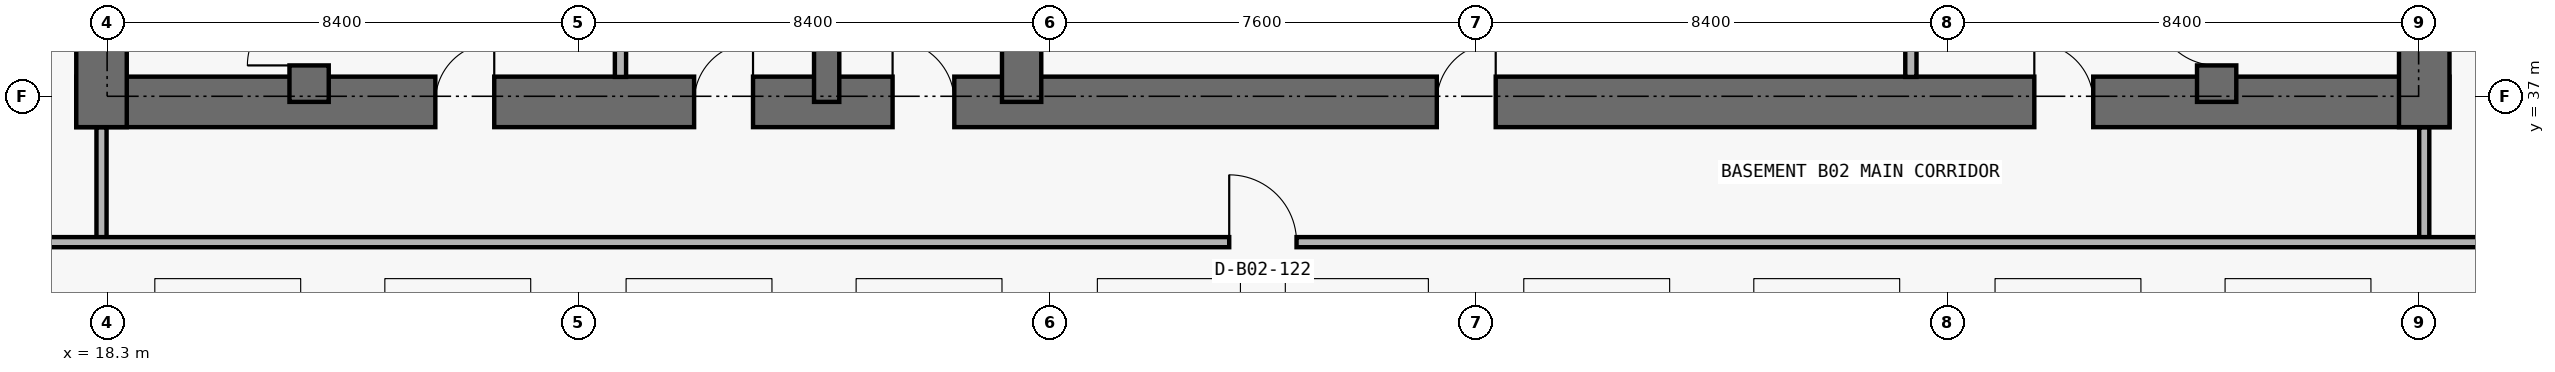
"""IFC4 building model, lengths in metres.
Left out: names, types, materials, properties, quantities, classifications, styles, units other than length and angle.
Written with IfcOpenShell. Run it as: python <this file> out.ifc"""

import sys

from ifc_helpers import new_model, si_unit, direction, frame, frame_2d, origin, place, context, subcontext, project, spatial, rectangle, extrude, element, fill, save


model = new_model("IFC4")
c1 = context("Model", 3, precision=1e-05, world=origin(), true_north=direction((0.0, 1.0)))
c2 = subcontext(c1, "Body", "Model", "MODEL_VIEW")
j1 = project(units=[si_unit("LENGTHUNIT", "METRE"), si_unit("PLANEANGLEUNIT", "RADIAN")], contexts=[c1])
p1 = place(None, origin())
s1 = spatial("IfcSite", under=j1, at=p1, CompositionType="ELEMENT")
p2 = place(p1, origin())
s2 = spatial("IfcBuilding", under=s1, at=p2, CompositionType="ELEMENT")
p3 = place(p2, frame((0.0, 0.0, -9.0)))
s3 = spatial("IfcBuildingStorey", under=s2, at=p3, CompositionType="ELEMENT", Elevation=-9.0)
p4 = place(p3, frame((17.75, 36.9, 0.0), z_axis=(0.0, 0.0, 1.0), x_axis=(1.0, 0.0, 0.0)))
e1 = element("IfcWall", 1, at=p4, inside=s3, PredefinedType="SHEAR", context=c2, shape_type="SweptSolid", body=[
    extrude(rectangle(XDim=42.3, YDim=0.9, at=frame_2d((21.15, 0.0))), origin(), (0.0, 0.0, 1.0), 4.2),
])
p5 = place(p4, frame((14.55, 0.0, 0.0)))
e2 = element("IfcOpeningElement", 2, at=p5, cuts=e1, PredefinedType="OPENING", context=c2, shape_type="SweptSolid", body=[
    extrude(rectangle(XDim=1.1, YDim=2.15, at=frame_2d((0.55, 1.075))), frame((0.0, 0.46, 0.0), z_axis=(0.0, -1.0, 0.0), x_axis=(1.0, 0.0, 0.0)), (0.0, 0.0, 1.0), 0.92),
])
p6 = place(p4, frame((6.4, 0.0, 0.0)))
e3 = element("IfcOpeningElement", 3, at=p6, cuts=e1, PredefinedType="OPENING", context=c2, shape_type="SweptSolid", body=[
    extrude(rectangle(XDim=1.05, YDim=2.15, at=frame_2d((0.525, 1.075))), frame((0.0, 0.46, 0.0), z_axis=(0.0, -1.0, 0.0), x_axis=(1.0, 0.0, 0.0)), (0.0, 0.0, 1.0), 0.92),
])
p7 = place(p4, frame((34.9, 0.0, 0.0)))
e4 = element("IfcOpeningElement", 4, at=p7, cuts=e1, PredefinedType="OPENING", context=c2, shape_type="SweptSolid", body=[
    extrude(rectangle(XDim=1.05, YDim=2.15, at=frame_2d((0.525, 1.075))), frame((0.0, 0.46, 0.0), z_axis=(0.0, -1.0, 0.0), x_axis=(1.0, 0.0, 0.0)), (0.0, 0.0, 1.0), 0.92),
])
p8 = place(p4, frame((11.012, 0.0, 0.0)))
e5 = element("IfcOpeningElement", 5, at=p8, cuts=e1, PredefinedType="OPENING", context=c2, shape_type="SweptSolid", body=[
    extrude(rectangle(XDim=1.05, YDim=2.15, at=frame_2d((0.525, 1.075))), frame((0.0, 0.46, 0.0), z_axis=(0.0, -1.0, 0.0), x_axis=(1.0, 0.0, 0.0)), (0.0, 0.0, 1.0), 0.92),
])
p9 = place(p4, frame((24.25, 0.0, 0.0)))
e6 = element("IfcOpeningElement", 6, at=p9, cuts=e1, PredefinedType="OPENING", context=c2, shape_type="SweptSolid", body=[
    extrude(rectangle(XDim=1.05, YDim=2.15, at=frame_2d((0.525, 1.075))), frame((0.0, 0.46, 0.0), z_axis=(0.0, -1.0, 0.0), x_axis=(1.0, 0.0, 0.0)), (0.0, 0.0, 1.0), 0.92),
])
for number, where, z_axis, x_axis in (
    (7, (18.2, 36.45, 0.0), (0.0, 0.0, 1.0), (0.0, 1.0, 0.0)),
    (8, (59.6, 36.45, 0.0), (0.0, 0.0, 1.0), (0.0, 1.0, 0.0)),
):
    element("IfcWall", number, at=place(p3, frame(where, z_axis=z_axis, x_axis=x_axis)), inside=s3, PredefinedType="SHEAR", context=c2, shape_type="SweptSolid", body=[
        extrude(rectangle(XDim=14.15, YDim=0.9, at=frame_2d((7.075, 0.0))), origin(), (0.0, 0.0, 1.0), 4.2),
    ])
p10 = place(p3, frame((21.9, 36.9, 0.0), z_axis=(0.0, 0.0, 1.0), x_axis=(0.0, 1.0, 0.0)))
e9 = element("IfcWall", 9, at=p10, inside=s3, PredefinedType="SHEAR", context=c2, shape_type="SweptSolid", body=[
    extrude(rectangle(XDim=9.675, YDim=0.7, at=frame_2d((4.837, 0.0))), origin(), (0.0, 0.0, 1.0), 4.2),
])
p11 = place(p10, frame((0.65, 0.0, 0.0)))
e10 = element("IfcOpeningElement", 10, at=p11, cuts=e9, PredefinedType="OPENING", context=c2, shape_type="SweptSolid", body=[
    extrude(rectangle(XDim=1.1, YDim=2.15, at=frame_2d((0.55, 1.075))), frame((0.0, 0.36, 0.0), z_axis=(0.0, -1.0, 0.0), x_axis=(1.0, 0.0, 0.0)), (0.0, 0.0, 1.0), 0.72),
])
p12 = place(p3, frame((55.9, 36.9, 0.0), z_axis=(0.0, 0.0, 1.0), x_axis=(0.0, 1.0, 0.0)))
e11 = element("IfcWall", 11, at=p12, inside=s3, PredefinedType="SHEAR", context=c2, shape_type="SweptSolid", body=[
    extrude(rectangle(XDim=9.675, YDim=0.7, at=frame_2d((4.837, 0.0))), origin(), (0.0, 0.0, 1.0), 4.2),
])
p13 = place(p12, frame((0.65, 0.0, 0.0)))
e12 = element("IfcOpeningElement", 12, at=p13, cuts=e11, PredefinedType="OPENING", context=c2, shape_type="SweptSolid", body=[
    extrude(rectangle(XDim=1.1, YDim=2.15, at=frame_2d((0.55, 1.075))), frame((0.0, 0.36, 0.0), z_axis=(0.0, -1.0, 0.0), x_axis=(1.0, 0.0, 0.0)), (0.0, 0.0, 1.0), 0.72),
])
p14 = place(p3, frame((31.125, 36.9, 0.0), z_axis=(0.0, 0.0, 1.0), x_axis=(0.0, 1.0, 0.0)))
e13 = element("IfcWall", 13, at=p14, inside=s3, PredefinedType="SHEAR", context=c2, shape_type="SweptSolid", body=[
    extrude(rectangle(XDim=9.675, YDim=0.45, at=frame_2d((4.837, 0.0))), origin(), (0.0, 0.0, 1.0), 4.2),
])
p15 = place(p3, frame((34.6, 36.9, 0.0), z_axis=(0.0, 0.0, 1.0), x_axis=(0.0, 1.0, 0.0)))
e14 = element("IfcWall", 14, at=p15, inside=s3, PredefinedType="SHEAR", context=c2, shape_type="SweptSolid", body=[
    extrude(rectangle(XDim=9.675, YDim=0.7, at=frame_2d((4.837, 0.0))), origin(), (0.0, 0.0, 1.0), 4.2),
])
p16 = place(p3, frame((18.2, 34.4, 0.0), z_axis=(0.0, 0.0, 1.0), x_axis=(0.0, 1.0, 0.0)))
e15 = element("IfcWall", 15, at=p16, inside=s3, PredefinedType="PARTITIONING", context=c2, shape_type="SweptSolid", body=[
    extrude(rectangle(XDim=2.045, YDim=0.18, at=frame_2d((1.022, 0.0))), origin(), (0.0, 0.0, 1.0), 3.085),
])
for number, where, z_axis, x_axis in (
    (16, (27.45, 37.345, 0.0), (0.0, 0.0, 1.0), (0.0, 1.0, 0.0)),
    (17, (50.45, 37.345, 0.0), (0.0, 0.0, 1.0), (0.0, 1.0, 0.0)),
):
    element("IfcWall", number, at=place(p3, frame(where, z_axis=z_axis, x_axis=x_axis)), inside=s3, PredefinedType="PARTITIONING", context=c2, shape_type="SweptSolid", body=[
        extrude(rectangle(XDim=5.385, YDim=0.2, at=frame_2d((2.692, 0.0))), origin(), (0.0, 0.0, 1.0), 4.2),
    ])
p17 = place(p3, frame((59.6, 34.4, 0.0), z_axis=(0.0, 0.0, 1.0), x_axis=(0.0, 1.0, 0.0)))
e18 = element("IfcWall", 18, at=p17, inside=s3, PredefinedType="PARTITIONING", context=c2, shape_type="SweptSolid", body=[
    extrude(rectangle(XDim=2.045, YDim=0.18, at=frame_2d((1.022, 0.0))), origin(), (0.0, 0.0, 1.0), 3.085),
])
p18 = place(p3, frame((8.15, 34.4, 0.0), z_axis=(0.0, 0.0, 1.0), x_axis=(1.0, 0.0, 0.0)))
e19 = element("IfcWall", 19, at=p18, inside=s3, PredefinedType="PARTITIONING", context=c2, shape_type="SweptSolid", body=[
    extrude(rectangle(XDim=61.5, YDim=0.18, at=frame_2d((30.75, 0.0))), origin(), (0.0, 0.0, 1.0), 4.2),
])
p19 = place(p18, frame((30.15, 0.0, 0.0)))
e20 = element("IfcOpeningElement", 20, at=p19, cuts=e19, PredefinedType="OPENING", context=c2, shape_type="SweptSolid", body=[
    extrude(rectangle(XDim=1.2, YDim=2.2, at=frame_2d((0.6, 1.1))), frame((0.0, 0.1, 0.0), z_axis=(0.0, -1.0, 0.0), x_axis=(1.0, 0.0, 0.0)), (0.0, 0.0, 1.0), 0.2),
])
p20 = place(p18, frame((4.425, 0.0, 0.0)))
e21 = element("IfcOpeningElement", 21, at=p20, cuts=e19, PredefinedType="OPENING", context=c2, shape_type="SweptSolid", body=[
    extrude(rectangle(XDim=1.2, YDim=2.2, at=frame_2d((0.6, 1.1))), frame((0.0, 0.1, 0.0), z_axis=(0.0, -1.0, 0.0), x_axis=(1.0, 0.0, 0.0)), (0.0, 0.0, 1.0), 0.2),
])
p21 = place(p18, frame((55.875, 0.0, 0.0)))
e22 = element("IfcOpeningElement", 22, at=p21, cuts=e19, PredefinedType="OPENING", context=c2, shape_type="SweptSolid", body=[
    extrude(rectangle(XDim=1.2, YDim=2.2, at=frame_2d((0.6, 1.1))), frame((0.0, 0.1, 0.0), z_axis=(0.0, -1.0, 0.0), x_axis=(1.0, 0.0, 0.0)), (0.0, 0.0, 1.0), 0.2),
])
p22 = place(p5, origin())
e23 = element("IfcDoor", 23, at=p22, inside=s3, OperationType="SINGLE_SWING_LEFT", PredefinedType="DOOR", context=c2, shape_type="SweptSolid", body=[
    extrude(rectangle(XDim=1.1, YDim=2.15, at=frame_2d((0.55, 1.075))), frame((0.0, 0.025, 0.0), z_axis=(0.0, -1.0, 0.0), x_axis=(1.0, 0.0, 0.0)), (0.0, 0.0, 1.0), 0.05),
])
fill(e2, e23)
p23 = place(p6, origin())
e24 = element("IfcDoor", 24, at=p23, inside=s3, OperationType="SINGLE_SWING_RIGHT", PredefinedType="DOOR", context=c2, shape_type="SweptSolid", body=[
    extrude(rectangle(XDim=1.05, YDim=2.15, at=frame_2d((0.525, 1.075))), frame((0.0, 0.025, 0.0), z_axis=(0.0, -1.0, 0.0), x_axis=(1.0, 0.0, 0.0)), (0.0, 0.0, 1.0), 0.05),
])
fill(e3, e24)
p24 = place(p11, origin())
e25 = element("IfcDoor", 25, at=p24, inside=s3, OperationType="SINGLE_SWING_LEFT", PredefinedType="DOOR", context=c2, shape_type="SweptSolid", body=[
    extrude(rectangle(XDim=1.1, YDim=2.15, at=frame_2d((0.55, 1.075))), frame((0.0, 0.025, 0.0), z_axis=(0.0, -1.0, 0.0), x_axis=(1.0, 0.0, 0.0)), (0.0, 0.0, 1.0), 0.05),
])
fill(e10, e25)
p25 = place(p7, origin())
e26 = element("IfcDoor", 26, at=p25, inside=s3, OperationType="SINGLE_SWING_LEFT", PredefinedType="DOOR", context=c2, shape_type="SweptSolid", body=[
    extrude(rectangle(XDim=1.05, YDim=2.15, at=frame_2d((0.525, 1.075))), frame((0.0, 0.025, 0.0), z_axis=(0.0, -1.0, 0.0), x_axis=(1.0, 0.0, 0.0)), (0.0, 0.0, 1.0), 0.05),
])
fill(e4, e26)
p26 = place(p13, origin())
e27 = element("IfcDoor", 27, at=p26, inside=s3, OperationType="SINGLE_SWING_RIGHT", PredefinedType="DOOR", context=c2, shape_type="SweptSolid", body=[
    extrude(rectangle(XDim=1.1, YDim=2.15, at=frame_2d((0.55, 1.075))), frame((0.0, 0.025, 0.0), z_axis=(0.0, -1.0, 0.0), x_axis=(1.0, 0.0, 0.0)), (0.0, 0.0, 1.0), 0.05),
])
fill(e12, e27)
p27 = place(p8, origin())
e28 = element("IfcDoor", 28, at=p27, inside=s3, OperationType="SINGLE_SWING_RIGHT", PredefinedType="DOOR", context=c2, shape_type="SweptSolid", body=[
    extrude(rectangle(XDim=1.05, YDim=2.15, at=frame_2d((0.525, 1.075))), frame((0.0, 0.025, 0.0), z_axis=(0.0, -1.0, 0.0), x_axis=(1.0, 0.0, 0.0)), (0.0, 0.0, 1.0), 0.05),
])
fill(e5, e28)
p28 = place(p9, origin())
e29 = element("IfcDoor", 29, at=p28, inside=s3, OperationType="SINGLE_SWING_RIGHT", PredefinedType="DOOR", context=c2, shape_type="SweptSolid", body=[
    extrude(rectangle(XDim=1.05, YDim=2.15, at=frame_2d((0.525, 1.075))), frame((0.0, 0.025, 0.0), z_axis=(0.0, -1.0, 0.0), x_axis=(1.0, 0.0, 0.0)), (0.0, 0.0, 1.0), 0.05),
])
fill(e6, e29)
p29 = place(p19, origin())
e30 = element("IfcDoor", 30, at=p29, inside=s3, OperationType="SINGLE_SWING_LEFT", PredefinedType="DOOR", context=c2, shape_type="SweptSolid", body=[
    extrude(rectangle(XDim=1.2, YDim=2.2, at=frame_2d((0.6, 1.1))), frame((0.0, 0.025, 0.0), z_axis=(0.0, -1.0, 0.0), x_axis=(1.0, 0.0, 0.0)), (0.0, 0.0, 1.0), 0.05),
])
fill(e20, e30)
save(model, sys.argv[1])
